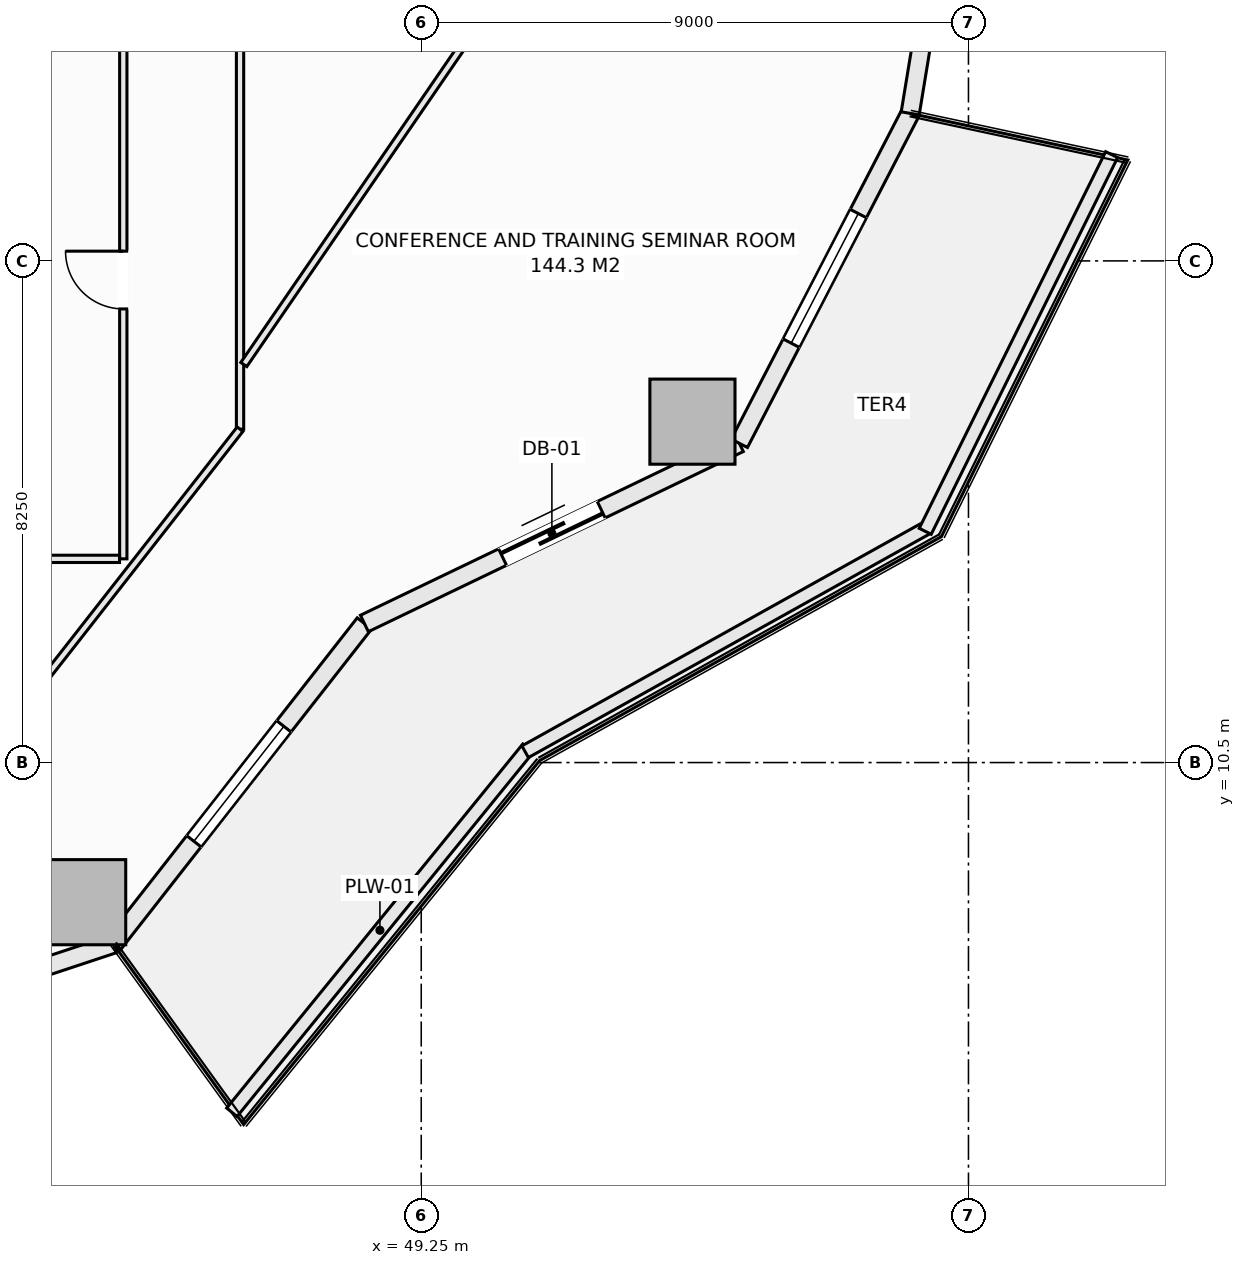
"""IFC4 building model, lengths in metres.
Left out: names, types, materials, properties, quantities, classifications, styles, units other than length and angle.
Written with IfcOpenShell. Run it as: python <this file> out.ifc"""

import sys

from ifc_helpers import new_model, si_unit, direction, frame, frame_2d, origin, origin_2d, place, context, subcontext, project, spatial, rectangle, extrude, element, fill, save


model = new_model("IFC4")
c1 = context("Model", 3, precision=1e-05, world=origin(), true_north=direction((0.0, 1.0)))
c2 = subcontext(c1, "Body", "Model", "MODEL_VIEW")
j1 = project(units=[si_unit("LENGTHUNIT", "METRE"), si_unit("PLANEANGLEUNIT", "RADIAN")], contexts=[c1])
p1 = place(None, origin())
s1 = spatial("IfcSite", under=j1, at=p1, CompositionType="ELEMENT")
p2 = place(p1, origin())
s2 = spatial("IfcBuilding", under=s1, at=p2, CompositionType="ELEMENT")
p3 = place(p2, frame((0.0, 0.0, 38.05)))
s3 = spatial("IfcBuildingStorey", under=s2, at=p3, CompositionType="ELEMENT", Elevation=38.05)
for number, where, z_axis, x_axis in (
    (1, (43.69, 8.204, -0.28), (0.0, 0.0, 1.0), (1.0, 0.0, 0.0)),
    (2, (53.71, 16.106, -0.28), (0.0, 0.0, 1.0), (1.0, 0.0, 0.0)),
):
    element("IfcColumn", number, at=place(p3, frame(where, z_axis=z_axis, x_axis=x_axis)), inside=s3, PredefinedType="COLUMN", context=c2, shape_type="SweptSolid", body=[
        extrude(rectangle(XDim=1.4, YDim=1.4, at=origin_2d()), origin(), (0.0, 0.0, 1.0), 3.85),
    ])
p4 = place(p3, frame((37.404, 5.267, 0.0), z_axis=(0.0, 0.0, 1.0), x_axis=(0.949238715533, 0.31455661006, 0.0)))
e3 = element("IfcWall", 3, at=p4, inside=s3, PredefinedType="SOLIDWALL", context=c2, shape_type="SweptSolid", body=[
    extrude(rectangle(XDim=7.146, YDim=0.3, at=frame_2d((3.573, 0.0))), origin(), (0.0, 0.0, 1.0), 3.093),
])
p5 = place(p4, frame((2.373, 0.0, 0.85)))
e4 = element("IfcOpeningElement", 4, at=p5, cuts=e3, PredefinedType="OPENING", context=c2, shape_type="SweptSolid", body=[
    extrude(rectangle(XDim=2.4, YDim=1.9, at=frame_2d((1.2, 0.95))), frame((0.0, 0.16, 0.0), z_axis=(0.0, -1.0, 0.0), x_axis=(1.0, 0.0, 0.0)), (0.0, 0.0, 1.0), 0.32),
])
p6 = place(p3, frame((44.188, 7.514, 0.0), z_axis=(0.0, 0.0, 1.0), x_axis=(0.616421309777, 0.787416515482, 0.0)))
e5 = element("IfcWall", 5, at=p6, inside=s3, PredefinedType="SOLIDWALL", context=c2, shape_type="SweptSolid", body=[
    extrude(rectangle(XDim=6.696, YDim=0.3, at=frame_2d((3.348, 0.0))), origin(), (0.0, 0.0, 1.0), 3.093),
])
p7 = place(p6, frame((2.148, 0.0, 0.85)))
e6 = element("IfcOpeningElement", 6, at=p7, cuts=e5, PredefinedType="OPENING", context=c2, shape_type="SweptSolid", body=[
    extrude(rectangle(XDim=2.4, YDim=1.9, at=frame_2d((1.2, 0.95))), frame((0.0, 0.16, 0.0), z_axis=(0.0, -1.0, 0.0), x_axis=(1.0, 0.0, 0.0)), (0.0, 0.0, 1.0), 0.32),
])
p8 = place(p3, frame((48.315, 12.787, 0.0), z_axis=(0.0, 0.0, 1.0), x_axis=(0.901360393999, 0.433069786673, 0.0)))
e7 = element("IfcWall", 7, at=p8, inside=s3, PredefinedType="SOLIDWALL", context=c2, shape_type="SweptSolid", body=[
    extrude(rectangle(XDim=6.842, YDim=0.3, at=frame_2d((3.421, 0.0))), origin(), (0.0, 0.0, 1.0), 3.093),
])
p9 = place(p8, frame((2.521, 0.0, 0.0)))
e8 = element("IfcOpeningElement", 8, at=p9, cuts=e7, PredefinedType="OPENING", context=c2, shape_type="SweptSolid", body=[
    extrude(rectangle(XDim=1.8, YDim=2.25, at=frame_2d((0.9, 1.125))), frame((0.0, 0.16, 0.0), z_axis=(0.0, -1.0, 0.0), x_axis=(1.0, 0.0, 0.0)), (0.0, 0.0, 1.0), 0.32),
])
p10 = place(p3, frame((54.482, 15.75, 0.0), z_axis=(0.0, 0.0, 1.0), x_axis=(0.459809804413, 0.88801742312, 0.0)))
e9 = element("IfcWall", 9, at=p10, inside=s3, PredefinedType="SOLIDWALL", context=c2, shape_type="SweptSolid", body=[
    extrude(rectangle(XDim=6.111, YDim=0.3, at=frame_2d((3.055, 0.0))), origin(), (0.0, 0.0, 1.0), 3.093),
])
p11 = place(p10, frame((1.855, 0.0, 0.85)))
e10 = element("IfcOpeningElement", 10, at=p11, cuts=e9, PredefinedType="OPENING", context=c2, shape_type="SweptSolid", body=[
    extrude(rectangle(XDim=2.4, YDim=1.9, at=frame_2d((1.2, 0.95))), frame((0.0, 0.16, 0.0), z_axis=(0.0, -1.0, 0.0), x_axis=(1.0, 0.0, 0.0)), (0.0, 0.0, 1.0), 0.32),
])
p12 = place(p3, frame((57.292, 21.177, 0.0), z_axis=(0.0, 0.0, 1.0), x_axis=(0.162366057843, 0.98673059305, 0.0)))
e11 = element("IfcWall", 11, at=p12, inside=s3, PredefinedType="SOLIDWALL", context=c2, shape_type="SweptSolid", body=[
    extrude(rectangle(XDim=5.902, YDim=0.3, at=frame_2d((2.951, 0.0))), origin(), (0.0, 0.0, 1.0), 3.093),
])
p13 = place(p12, frame((1.751, 0.0, 0.85)))
e12 = element("IfcOpeningElement", 12, at=p13, cuts=e11, PredefinedType="OPENING", context=c2, shape_type="SweptSolid", body=[
    extrude(rectangle(XDim=2.4, YDim=1.9, at=frame_2d((1.2, 0.95))), frame((0.0, 0.16, 0.0), z_axis=(0.0, -1.0, 0.0), x_axis=(1.0, 0.0, 0.0)), (0.0, 0.0, 1.0), 0.32),
])
p14 = place(p3, frame((46.136, 4.749, 0.0), z_axis=(0.0, 0.0, 1.0), x_axis=(0.630997450658, 0.775784903993, 0.0)))
e13 = element("IfcWall", 13, at=p14, inside=s3, PredefinedType="PARAPET", context=c2, shape_type="SweptSolid", body=[
    extrude(rectangle(XDim=7.718, YDim=0.22, at=frame_2d((3.859, 0.0))), origin(), (0.0, 0.0, 1.0), 0.52),
])
p15 = place(p3, frame((50.959, 10.678, 0.0), z_axis=(0.0, 0.0, 1.0), x_axis=(0.873500119739, 0.48682393205, 0.0)))
e14 = element("IfcWall", 14, at=p15, inside=s3, PredefinedType="PARAPET", context=c2, shape_type="SweptSolid", body=[
    extrude(rectangle(XDim=7.562, YDim=0.22, at=frame_2d((3.781, 0.0))), origin(), (0.0, 0.0, 1.0), 0.52),
])
p16 = place(p3, frame((57.539, 14.303, 0.0), z_axis=(0.0, 0.0, 1.0), x_axis=(0.443578479433, 0.8962355341, 0.0)))
e15 = element("IfcWall", 15, at=p16, inside=s3, PredefinedType="PARAPET", context=c2, shape_type="SweptSolid", body=[
    extrude(rectangle(XDim=6.911, YDim=0.22, at=frame_2d((3.456, 0.0))), origin(), (0.0, 0.0, 1.0), 0.52),
])
p17 = place(p3, frame((44.35, 13.85, 0.0), z_axis=(0.0, 0.0, 1.0), x_axis=(0.0, 1.0, 0.0)))
e16 = element("IfcWall", 16, at=p17, inside=s3, PredefinedType="PARTITIONING", context=c2, shape_type="SweptSolid", body=[
    extrude(rectangle(XDim=9.17, YDim=0.12, at=frame_2d((4.585, 0.0))), origin(), (0.0, 0.0, 1.0), 3.57),
])
p18 = place(p17, frame((4.11, 0.0, 0.0)))
e17 = element("IfcOpeningElement", 17, at=p18, cuts=e16, PredefinedType="OPENING", context=c2, shape_type="SweptSolid", body=[
    extrude(rectangle(XDim=0.95, YDim=2.1, at=frame_2d((0.475, 1.05))), frame((0.0, 0.07, 0.0), z_axis=(0.0, -1.0, 0.0), x_axis=(1.0, 0.0, 0.0)), (0.0, 0.0, 1.0), 0.14),
])
p19 = place(p3, frame((46.27, 15.982, 0.0), z_axis=(0.0, 0.0, 1.0), x_axis=(0.0, 1.0, 0.0)))
e18 = element("IfcWall", 18, at=p19, inside=s3, PredefinedType="PARTITIONING", context=c2, shape_type="SweptSolid", body=[
    extrude(rectangle(XDim=22.036, YDim=0.12, at=frame_2d((11.018, 0.0))), origin(), (0.0, 0.0, 1.0), 3.57),
])
p20 = place(p19, frame((9.28, 0.0, 0.0)))
e19 = element("IfcOpeningElement", 19, at=p20, cuts=e18, PredefinedType="OPENING", context=c2, shape_type="SweptSolid", body=[
    extrude(rectangle(XDim=0.95, YDim=2.1, at=frame_2d((0.475, 1.05))), frame((0.0, 0.07, 0.0), z_axis=(0.0, -1.0, 0.0), x_axis=(1.0, 0.0, 0.0)), (0.0, 0.0, 1.0), 0.14),
])
p21 = place(p3, frame((42.957, 11.75, 0.0), z_axis=(0.0, 0.0, 1.0), x_axis=(0.616428289415, 0.78741105149, 0.0)))
e20 = element("IfcWall", 20, at=p21, inside=s3, PredefinedType="PARTITIONING", context=c2, shape_type="SweptSolid", body=[
    extrude(rectangle(XDim=5.375, YDim=0.12, at=frame_2d((2.687, 0.0))), origin(), (0.0, 0.0, 1.0), 3.57),
])
p22 = place(p3, frame((35.95, 13.85, 0.0), z_axis=(0.0, 0.0, 1.0), x_axis=(1.0, 0.0, 0.0)))
e21 = element("IfcWall", 21, at=p22, inside=s3, PredefinedType="PARTITIONING", context=c2, shape_type="SweptSolid", body=[
    extrude(rectangle(XDim=8.338, YDim=0.12, at=frame_2d((4.169, 0.0))), origin(), (0.0, 0.0, 1.0), 3.57),
])
p23 = place(p3, frame((46.332, 17.045, 0.0), z_axis=(0.0, 0.0, 1.0), x_axis=(0.565716902062, 0.824599531119, 0.0)))
e22 = element("IfcWall", 22, at=p23, inside=s3, PredefinedType="PARTITIONING", context=c2, shape_type="SweptSolid", body=[
    extrude(rectangle(XDim=19.098, YDim=0.12, at=frame_2d((9.549, 0.0))), origin(), (0.0, 0.0, 1.0), 3.57),
])
p24 = place(p7, origin())
e23 = element("IfcWindow", 23, at=p24, inside=s3, PartitioningType="SINGLE_PANEL", PredefinedType="WINDOW", context=c2, shape_type="SweptSolid", body=[
    extrude(rectangle(XDim=2.4, YDim=1.9, at=frame_2d((1.2, 0.95))), frame((0.0, 0.03, 0.0), z_axis=(0.0, -1.0, 0.0), x_axis=(1.0, 0.0, 0.0)), (0.0, 0.0, 1.0), 0.06),
])
fill(e6, e23)
p25 = place(p9, frame((1.8, 0.0, 0.0), z_axis=(0.0, 0.0, 1.0), x_axis=(-1.0, 0.0, 0.0)))
e24 = element("IfcDoor", 24, at=p25, inside=s3, OperationType="SLIDING_TO_LEFT", PredefinedType="DOOR", context=c2, shape_type="SweptSolid", body=[
    extrude(rectangle(XDim=1.8, YDim=2.25, at=frame_2d((0.9, 1.125))), frame((0.0, 0.025, 0.0), z_axis=(0.0, -1.0, 0.0), x_axis=(1.0, 0.0, 0.0)), (0.0, 0.0, 1.0), 0.05),
])
fill(e8, e24)
p26 = place(p11, origin())
e25 = element("IfcWindow", 25, at=p26, inside=s3, PartitioningType="SINGLE_PANEL", PredefinedType="WINDOW", context=c2, shape_type="SweptSolid", body=[
    extrude(rectangle(XDim=2.4, YDim=1.9, at=frame_2d((1.2, 0.95))), frame((0.0, 0.03, 0.0), z_axis=(0.0, -1.0, 0.0), x_axis=(1.0, 0.0, 0.0)), (0.0, 0.0, 1.0), 0.06),
])
fill(e10, e25)
p27 = place(p18, origin())
e26 = element("IfcDoor", 26, at=p27, inside=s3, OperationType="SINGLE_SWING_RIGHT", PredefinedType="DOOR", context=c2, shape_type="SweptSolid", body=[
    extrude(rectangle(XDim=0.95, YDim=2.1, at=frame_2d((0.475, 1.05))), frame((0.0, 0.025, 0.0), z_axis=(0.0, -1.0, 0.0), x_axis=(1.0, 0.0, 0.0)), (0.0, 0.0, 1.0), 0.05),
])
fill(e17, e26)
save(model, sys.argv[1])
